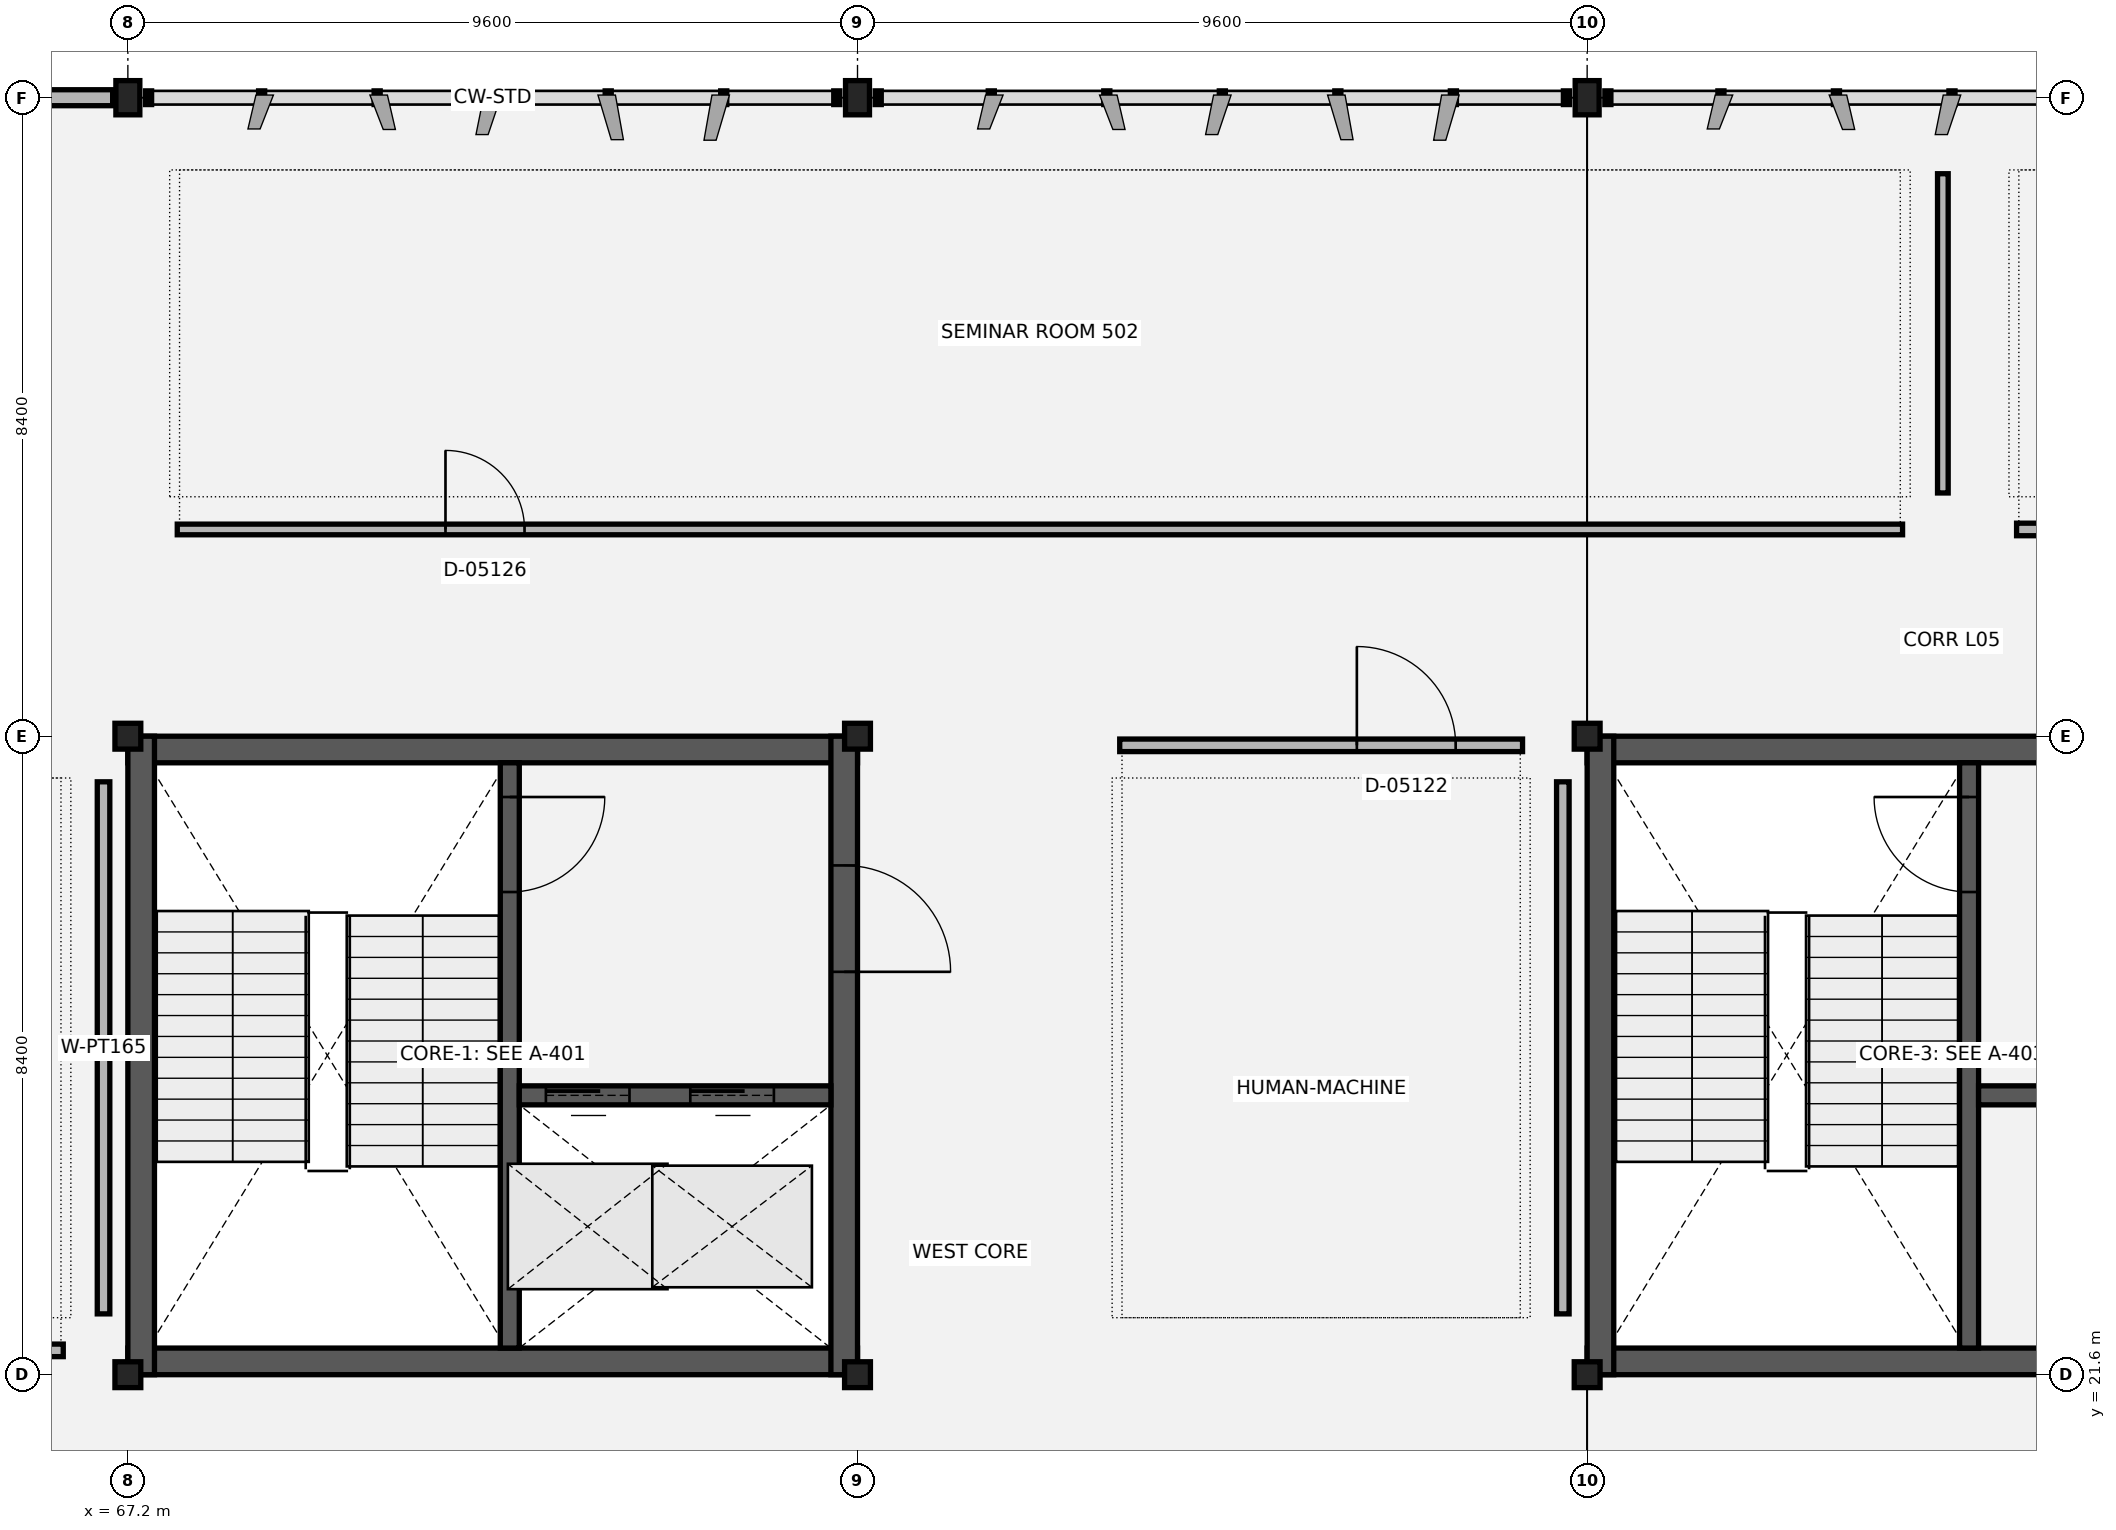
"""IFC4 building model, lengths in metres.
Left out: names, types, materials, properties, quantities, classifications, styles, units other than length and angle.
Written with IfcOpenShell. Run it as: python <this file> out.ifc"""

import sys

from ifc_helpers import new_model, si_unit, direction, frame, frame_2d, origin, origin_2d, place, context, subcontext, project, spatial, rectangle, extrude, element, fill, save


model = new_model("IFC4")
c1 = context("Model", 3, precision=1e-05, world=origin(), true_north=direction((0.0, 1.0)))
c2 = subcontext(c1, "Body", "Model", "MODEL_VIEW")
j1 = project(units=[si_unit("LENGTHUNIT", "METRE"), si_unit("PLANEANGLEUNIT", "RADIAN")], contexts=[c1])
p1 = place(None, origin())
s1 = spatial("IfcSite", under=j1, at=p1, CompositionType="ELEMENT")
p2 = place(p1, origin())
s2 = spatial("IfcBuilding", under=s1, at=p2, CompositionType="ELEMENT")
p3 = place(p2, frame((0.0, 0.0, 22.8)))
s3 = spatial("IfcBuildingStorey", under=s2, at=p3, CompositionType="ELEMENT", Elevation=22.8)
for number, where, z_axis, x_axis in (
    (1, (67.2, 21.6, 0.0), (0.0, 0.0, 1.0), (1.0, 0.0, 0.0)),
    (2, (67.2, 30.0, 0.0), (0.0, 0.0, 1.0), (1.0, 0.0, 0.0)),
):
    element("IfcColumn", number, at=place(p3, frame(where, z_axis=z_axis, x_axis=x_axis)), inside=s3, PredefinedType="COLUMN", context=c2, shape_type="SweptSolid", body=[
        extrude(rectangle(XDim=0.34, YDim=0.34, at=origin_2d()), origin(), (0.0, 0.0, 1.0), 4.2),
    ])
p4 = place(p3, frame((67.2, 38.4, 0.0), z_axis=(0.0, 0.0, 1.0), x_axis=(1.0, 0.0, 0.0)))
e3 = element("IfcColumn", 3, at=p4, inside=s3, PredefinedType="COLUMN", context=c2, shape_type="SweptSolid", body=[
    extrude(rectangle(XDim=0.315, YDim=0.45, at=origin_2d()), origin(), (0.0, 0.0, 1.0), 4.2),
])
for number, where, z_axis, x_axis in (
    (4, (76.8, 21.6, 0.0), (0.0, 0.0, 1.0), (1.0, 0.0, 0.0)),
    (5, (76.8, 30.0, 0.0), (0.0, 0.0, 1.0), (1.0, 0.0, 0.0)),
):
    element("IfcColumn", number, at=place(p3, frame(where, z_axis=z_axis, x_axis=x_axis)), inside=s3, PredefinedType="COLUMN", context=c2, shape_type="SweptSolid", body=[
        extrude(rectangle(XDim=0.34, YDim=0.34, at=origin_2d()), origin(), (0.0, 0.0, 1.0), 4.2),
    ])
p5 = place(p3, frame((76.8, 38.4, 0.0), z_axis=(0.0, 0.0, 1.0), x_axis=(1.0, 0.0, 0.0)))
e6 = element("IfcColumn", 6, at=p5, inside=s3, PredefinedType="COLUMN", context=c2, shape_type="SweptSolid", body=[
    extrude(rectangle(XDim=0.315, YDim=0.45, at=origin_2d()), origin(), (0.0, 0.0, 1.0), 4.2),
])
for number, where, z_axis, x_axis in (
    (7, (86.4, 21.6, 0.0), (0.0, 0.0, 1.0), (1.0, 0.0, 0.0)),
    (8, (86.4, 30.0, 0.0), (0.0, 0.0, 1.0), (1.0, 0.0, 0.0)),
):
    element("IfcColumn", number, at=place(p3, frame(where, z_axis=z_axis, x_axis=x_axis)), inside=s3, PredefinedType="COLUMN", context=c2, shape_type="SweptSolid", body=[
        extrude(rectangle(XDim=0.34, YDim=0.34, at=origin_2d()), origin(), (0.0, 0.0, 1.0), 4.2),
    ])
p6 = place(p3, frame((86.4, 38.4, 0.0), z_axis=(0.0, 0.0, 1.0), x_axis=(1.0, 0.0, 0.0)))
e9 = element("IfcColumn", 9, at=p6, inside=s3, PredefinedType="COLUMN", context=c2, shape_type="SweptSolid", body=[
    extrude(rectangle(XDim=0.315, YDim=0.45, at=origin_2d()), origin(), (0.0, 0.0, 1.0), 4.2),
])
p7 = place(p3, frame((67.0, 38.4, 0.0), z_axis=(0.0, 0.0, 1.0), x_axis=(-1.0, 0.0, 0.0)))
e10 = element("IfcWall", 10, at=p7, inside=s3, PredefinedType="SOLIDWALL", context=c2, shape_type="SweptSolid", body=[
    extrude(rectangle(XDim=4.4, YDim=0.21, at=frame_2d((2.2, 0.0))), origin(), (0.0, 0.0, 1.0), 3.07),
])
p8 = place(p7, frame((1.45, 0.0, 0.9)))
e11 = element("IfcOpeningElement", 11, at=p8, cuts=e10, PredefinedType="OPENING", context=c2, shape_type="SweptSolid", body=[
    extrude(rectangle(XDim=1.5, YDim=1.5, at=frame_2d((0.75, 0.75))), frame((0.0, 0.115, 0.0), z_axis=(0.0, -1.0, 0.0), x_axis=(1.0, 0.0, 0.0)), (0.0, 0.0, 1.0), 0.23),
])
for number, where, z_axis, x_axis in (
    (12, (67.2, 29.825, 0.0), (0.0, 0.0, 1.0), (1.0, 0.0, 0.0)),
    (13, (67.2, 21.775, 0.0), (0.0, 0.0, 1.0), (1.0, 0.0, 0.0)),
):
    element("IfcWall", number, at=place(p3, frame(where, z_axis=z_axis, x_axis=x_axis)), inside=s3, PredefinedType="SHEAR", context=c2, shape_type="SweptSolid", body=[
        extrude(rectangle(XDim=9.6, YDim=0.35, at=frame_2d((4.8, 0.0))), origin(), (0.0, 0.0, 1.0), 3.97),
    ])
p9 = place(p3, frame((67.375, 21.6, 0.0), z_axis=(0.0, 0.0, 1.0), x_axis=(0.0, 1.0, 0.0)))
e14 = element("IfcWall", 14, at=p9, inside=s3, PredefinedType="SHEAR", context=c2, shape_type="SweptSolid", body=[
    extrude(rectangle(XDim=8.4, YDim=0.35, at=frame_2d((4.2, 0.0))), origin(), (0.0, 0.0, 1.0), 3.97),
])
p10 = place(p3, frame((76.625, 21.6, 0.0), z_axis=(0.0, 0.0, 1.0), x_axis=(0.0, 1.0, 0.0)))
e15 = element("IfcWall", 15, at=p10, inside=s3, PredefinedType="SHEAR", context=c2, shape_type="SweptSolid", body=[
    extrude(rectangle(XDim=8.4, YDim=0.35, at=frame_2d((4.2, 0.0))), origin(), (0.0, 0.0, 1.0), 3.97),
])
p11 = place(p10, frame((5.3, 0.0, 0.0)))
e16 = element("IfcOpeningElement", 16, at=p11, cuts=e15, PredefinedType="OPENING", context=c2, shape_type="SweptSolid", body=[
    extrude(rectangle(XDim=1.4, YDim=2.15, at=frame_2d((0.7, 1.075))), frame((0.0, 0.185, 0.0), z_axis=(0.0, -1.0, 0.0), x_axis=(1.0, 0.0, 0.0)), (0.0, 0.0, 1.0), 0.37),
])
p12 = place(p3, frame((72.225, 29.65, 0.0), z_axis=(0.0, 0.0, 1.0), x_axis=(0.0, -1.0, 0.0)))
e17 = element("IfcWall", 17, at=p12, inside=s3, PredefinedType="SHEAR", context=c2, shape_type="SweptSolid", body=[
    extrude(rectangle(XDim=7.7, YDim=0.25, at=frame_2d((3.85, 0.0))), origin(), (0.0, 0.0, 1.0), 3.97),
])
p13 = place(p12, frame((0.45, 0.0, 0.0)))
e18 = element("IfcOpeningElement", 18, at=p13, cuts=e17, PredefinedType="OPENING", context=c2, shape_type="SweptSolid", body=[
    extrude(rectangle(XDim=1.25, YDim=2.15, at=frame_2d((0.625, 1.075))), frame((0.0, 0.135, 0.0), z_axis=(0.0, -1.0, 0.0), x_axis=(1.0, 0.0, 0.0)), (0.0, 0.0, 1.0), 0.27),
])
p14 = place(p3, frame((72.35, 25.275, 0.0), z_axis=(0.0, 0.0, 1.0), x_axis=(1.0, 0.0, 0.0)))
e19 = element("IfcWall", 19, at=p14, inside=s3, PredefinedType="SHEAR", context=c2, shape_type="SweptSolid", body=[
    extrude(rectangle(XDim=4.1, YDim=0.25, at=frame_2d((2.05, 0.0))), origin(), (0.0, 0.0, 1.0), 3.97),
])
p15 = place(p14, frame((0.35, 0.0, 0.0)))
e20 = element("IfcOpeningElement", 20, at=p15, cuts=e19, PredefinedType="OPENING", context=c2, shape_type="SweptSolid", body=[
    extrude(rectangle(XDim=1.1, YDim=2.15, at=frame_2d((0.55, 1.075))), frame((0.0, 0.135, 0.0), z_axis=(0.0, -1.0, 0.0), x_axis=(1.0, 0.0, 0.0)), (0.0, 0.0, 1.0), 0.27),
])
p16 = place(p14, frame((2.25, 0.0, 0.0)))
e21 = element("IfcOpeningElement", 21, at=p16, cuts=e19, PredefinedType="OPENING", context=c2, shape_type="SweptSolid", body=[
    extrude(rectangle(XDim=1.1, YDim=2.15, at=frame_2d((0.55, 1.075))), frame((0.0, 0.135, 0.0), z_axis=(0.0, -1.0, 0.0), x_axis=(1.0, 0.0, 0.0)), (0.0, 0.0, 1.0), 0.27),
])
for number, where, z_axis, x_axis in (
    (22, (86.4, 29.825, 0.0), (0.0, 0.0, 1.0), (1.0, 0.0, 0.0)),
    (23, (86.4, 21.775, 0.0), (0.0, 0.0, 1.0), (1.0, 0.0, 0.0)),
):
    element("IfcWall", number, at=place(p3, frame(where, z_axis=z_axis, x_axis=x_axis)), inside=s3, PredefinedType="SHEAR", context=c2, shape_type="SweptSolid", body=[
        extrude(rectangle(XDim=9.6, YDim=0.35, at=frame_2d((4.8, 0.0))), origin(), (0.0, 0.0, 1.0), 3.97),
    ])
p17 = place(p3, frame((86.575, 21.6, 0.0), z_axis=(0.0, 0.0, 1.0), x_axis=(0.0, 1.0, 0.0)))
e24 = element("IfcWall", 24, at=p17, inside=s3, PredefinedType="SHEAR", context=c2, shape_type="SweptSolid", body=[
    extrude(rectangle(XDim=8.4, YDim=0.35, at=frame_2d((4.2, 0.0))), origin(), (0.0, 0.0, 1.0), 3.97),
])
p18 = place(p3, frame((91.425, 29.65, 0.0), z_axis=(0.0, 0.0, 1.0), x_axis=(0.0, -1.0, 0.0)))
e25 = element("IfcWall", 25, at=p18, inside=s3, PredefinedType="SHEAR", context=c2, shape_type="SweptSolid", body=[
    extrude(rectangle(XDim=7.7, YDim=0.25, at=frame_2d((3.85, 0.0))), origin(), (0.0, 0.0, 1.0), 3.97),
])
p19 = place(p18, frame((0.45, 0.0, 0.0)))
e26 = element("IfcOpeningElement", 26, at=p19, cuts=e25, PredefinedType="OPENING", context=c2, shape_type="SweptSolid", body=[
    extrude(rectangle(XDim=1.25, YDim=2.15, at=frame_2d((0.625, 1.075))), frame((0.0, 0.135, 0.0), z_axis=(0.0, -1.0, 0.0), x_axis=(1.0, 0.0, 0.0)), (0.0, 0.0, 1.0), 0.27),
])
p20 = place(p3, frame((91.55, 25.275, 0.0), z_axis=(0.0, 0.0, 1.0), x_axis=(1.0, 0.0, 0.0)))
e27 = element("IfcWall", 27, at=p20, inside=s3, PredefinedType="SHEAR", context=c2, shape_type="SweptSolid", body=[
    extrude(rectangle(XDim=4.1, YDim=0.25, at=frame_2d((2.05, 0.0))), origin(), (0.0, 0.0, 1.0), 3.97),
])
p21 = place(p20, frame((1.4, 0.0, 0.0)))
e28 = element("IfcOpeningElement", 28, at=p21, cuts=e27, PredefinedType="OPENING", context=c2, shape_type="SweptSolid", body=[
    extrude(rectangle(XDim=1.2, YDim=2.15, at=frame_2d((0.6, 1.075))), frame((0.0, 0.135, 0.0), z_axis=(0.0, -1.0, 0.0), x_axis=(1.0, 0.0, 0.0)), (0.0, 0.0, 1.0), 0.27),
])
p22 = place(p3, frame((63.45, 21.92, 0.0), z_axis=(0.0, 0.0, 1.0), x_axis=(1.0, 0.0, 0.0)))
e29 = element("IfcWall", 29, at=p22, inside=s3, PredefinedType="PARTITIONING", context=c2, shape_type="SweptSolid", body=[
    extrude(rectangle(XDim=2.9, YDim=0.165, at=frame_2d((1.45, 0.0))), origin(), (0.0, 0.0, 1.0), 3.05),
])
p23 = place(p22, frame((0.72, 0.0, 0.0)))
e30 = element("IfcOpeningElement", 30, at=p23, cuts=e29, PredefinedType="OPENING", context=c2, shape_type="SweptSolid", body=[
    extrude(rectangle(XDim=1.3, YDim=2.15, at=frame_2d((0.65, 1.075))), frame((0.0, 0.093, 0.0), z_axis=(0.0, -1.0, 0.0), x_axis=(1.0, 0.0, 0.0)), (0.0, 0.0, 1.0), 0.185),
])
p24 = place(p3, frame((66.88, 22.4, 0.0), z_axis=(0.0, 0.0, 1.0), x_axis=(0.0, 1.0, 0.0)))
e31 = element("IfcWall", 31, at=p24, inside=s3, PredefinedType="PARTITIONING", context=c2, shape_type="SweptSolid", body=[
    extrude(rectangle(XDim=7.0, YDim=0.165, at=frame_2d((3.5, 0.0))), origin(), (0.0, 0.0, 1.0), 3.05),
])
p25 = place(p3, frame((80.25, 29.88, 0.0), z_axis=(0.0, 0.0, 1.0), x_axis=(1.0, 0.0, 0.0)))
e32 = element("IfcWall", 32, at=p25, inside=s3, PredefinedType="PARTITIONING", context=c2, shape_type="SweptSolid", body=[
    extrude(rectangle(XDim=5.3, YDim=0.165, at=frame_2d((2.65, 0.0))), origin(), (0.0, 0.0, 1.0), 3.05),
])
p26 = place(p25, frame((3.12, 0.0, 0.0)))
e33 = element("IfcOpeningElement", 33, at=p26, cuts=e32, PredefinedType="OPENING", context=c2, shape_type="SweptSolid", body=[
    extrude(rectangle(XDim=1.3, YDim=2.15, at=frame_2d((0.65, 1.075))), frame((0.0, 0.093, 0.0), z_axis=(0.0, -1.0, 0.0), x_axis=(1.0, 0.0, 0.0)), (0.0, 0.0, 1.0), 0.185),
])
p27 = place(p3, frame((86.08, 22.4, 0.0), z_axis=(0.0, 0.0, 1.0), x_axis=(0.0, 1.0, 0.0)))
e34 = element("IfcWall", 34, at=p27, inside=s3, PredefinedType="PARTITIONING", context=c2, shape_type="SweptSolid", body=[
    extrude(rectangle(XDim=7.0, YDim=0.165, at=frame_2d((3.5, 0.0))), origin(), (0.0, 0.0, 1.0), 3.05),
])
p28 = place(p3, frame((67.85, 32.72, 0.0), z_axis=(0.0, 0.0, 1.0), x_axis=(1.0, 0.0, 0.0)))
e35 = element("IfcWall", 35, at=p28, inside=s3, PredefinedType="PARTITIONING", context=c2, shape_type="SweptSolid", body=[
    extrude(rectangle(XDim=22.7, YDim=0.14, at=frame_2d((11.35, 0.0))), origin(), (0.0, 0.0, 1.0), 3.05),
])
p29 = place(p28, frame((3.529, 0.0, 0.0)))
e36 = element("IfcOpeningElement", 36, at=p29, cuts=e35, PredefinedType="OPENING", context=c2, shape_type="SweptSolid", body=[
    extrude(rectangle(XDim=1.04, YDim=2.15, at=frame_2d((0.52, 1.075))), frame((0.0, 0.08, 0.0), z_axis=(0.0, -1.0, 0.0), x_axis=(1.0, 0.0, 0.0)), (0.0, 0.0, 1.0), 0.16),
])
p30 = place(p3, frame((91.08, 33.2, 0.0), z_axis=(0.0, 0.0, 1.0), x_axis=(0.0, 1.0, 0.0)))
e37 = element("IfcWall", 37, at=p30, inside=s3, PredefinedType="PARTITIONING", context=c2, shape_type="SweptSolid", body=[
    extrude(rectangle(XDim=4.2, YDim=0.14, at=frame_2d((2.1, 0.0))), origin(), (0.0, 0.0, 1.0), 3.05),
])
p31 = place(p3, frame((92.05, 32.72, 0.0), z_axis=(0.0, 0.0, 1.0), x_axis=(1.0, 0.0, 0.0)))
e38 = element("IfcWall", 38, at=p31, inside=s3, PredefinedType="PARTITIONING", context=c2, shape_type="SweptSolid", body=[
    extrude(rectangle(XDim=22.5, YDim=0.165, at=frame_2d((11.25, 0.0))), origin(), (0.0, 0.0, 1.0), 3.05),
])
p32 = place(p31, frame((17.74, 0.0, 0.0)))
e39 = element("IfcOpeningElement", 39, at=p32, cuts=e38, PredefinedType="OPENING", context=c2, shape_type="SweptSolid", body=[
    extrude(rectangle(XDim=1.3, YDim=2.15, at=frame_2d((0.65, 1.075))), frame((0.0, 0.093, 0.0), z_axis=(0.0, -1.0, 0.0), x_axis=(1.0, 0.0, 0.0)), (0.0, 0.0, 1.0), 0.185),
])
p33 = place(p13, origin())
e40 = element("IfcDoor", 40, at=p33, inside=s3, OperationType="SINGLE_SWING_LEFT", PredefinedType="DOOR", context=c2, shape_type="SweptSolid", body=[
    extrude(rectangle(XDim=1.25, YDim=2.15, at=frame_2d((0.625, 1.075))), frame((0.0, 0.025, 0.0), z_axis=(0.0, -1.0, 0.0), x_axis=(1.0, 0.0, 0.0)), (0.0, 0.0, 1.0), 0.05),
])
fill(e18, e40)
p34 = place(p15, origin())
e41 = element("IfcDoor", 41, at=p34, inside=s3, OperationType="SLIDING_TO_LEFT", PredefinedType="DOOR", context=c2, shape_type="SweptSolid", body=[
    extrude(rectangle(XDim=1.1, YDim=2.15, at=frame_2d((0.55, 1.075))), frame((0.0, 0.025, 0.0), z_axis=(0.0, -1.0, 0.0), x_axis=(1.0, 0.0, 0.0)), (0.0, 0.0, 1.0), 0.05),
])
fill(e20, e41)
p35 = place(p16, origin())
e42 = element("IfcDoor", 42, at=p35, inside=s3, OperationType="SLIDING_TO_LEFT", PredefinedType="DOOR", context=c2, shape_type="SweptSolid", body=[
    extrude(rectangle(XDim=1.1, YDim=2.15, at=frame_2d((0.55, 1.075))), frame((0.0, 0.025, 0.0), z_axis=(0.0, -1.0, 0.0), x_axis=(1.0, 0.0, 0.0)), (0.0, 0.0, 1.0), 0.05),
])
fill(e21, e42)
p36 = place(p11, origin())
e43 = element("IfcDoor", 43, at=p36, inside=s3, OperationType="SINGLE_SWING_RIGHT", PredefinedType="DOOR", context=c2, shape_type="SweptSolid", body=[
    extrude(rectangle(XDim=1.4, YDim=2.15, at=frame_2d((0.7, 1.075))), frame((0.0, 0.025, 0.0), z_axis=(0.0, -1.0, 0.0), x_axis=(1.0, 0.0, 0.0)), (0.0, 0.0, 1.0), 0.05),
])
fill(e16, e43)
p37 = place(p19, origin())
e44 = element("IfcDoor", 44, at=p37, inside=s3, OperationType="SINGLE_SWING_RIGHT", PredefinedType="DOOR", context=c2, shape_type="SweptSolid", body=[
    extrude(rectangle(XDim=1.25, YDim=2.15, at=frame_2d((0.625, 1.075))), frame((0.0, 0.025, 0.0), z_axis=(0.0, -1.0, 0.0), x_axis=(1.0, 0.0, 0.0)), (0.0, 0.0, 1.0), 0.05),
])
fill(e26, e44)
p38 = place(p26, origin())
e45 = element("IfcDoor", 45, at=p38, inside=s3, OperationType="SINGLE_SWING_LEFT", PredefinedType="DOOR", context=c2, shape_type="SweptSolid", body=[
    extrude(rectangle(XDim=1.3, YDim=2.15, at=frame_2d((0.65, 1.075))), frame((0.0, 0.025, 0.0), z_axis=(0.0, -1.0, 0.0), x_axis=(1.0, 0.0, 0.0)), (0.0, 0.0, 1.0), 0.05),
])
fill(e33, e45)
p39 = place(p29, origin())
e46 = element("IfcDoor", 46, at=p39, inside=s3, OperationType="SINGLE_SWING_LEFT", PredefinedType="DOOR", context=c2, shape_type="SweptSolid", body=[
    extrude(rectangle(XDim=1.04, YDim=2.15, at=frame_2d((0.52, 1.075))), frame((0.0, 0.025, 0.0), z_axis=(0.0, -1.0, 0.0), x_axis=(1.0, 0.0, 0.0)), (0.0, 0.0, 1.0), 0.05),
])
fill(e36, e46)
save(model, sys.argv[1])
